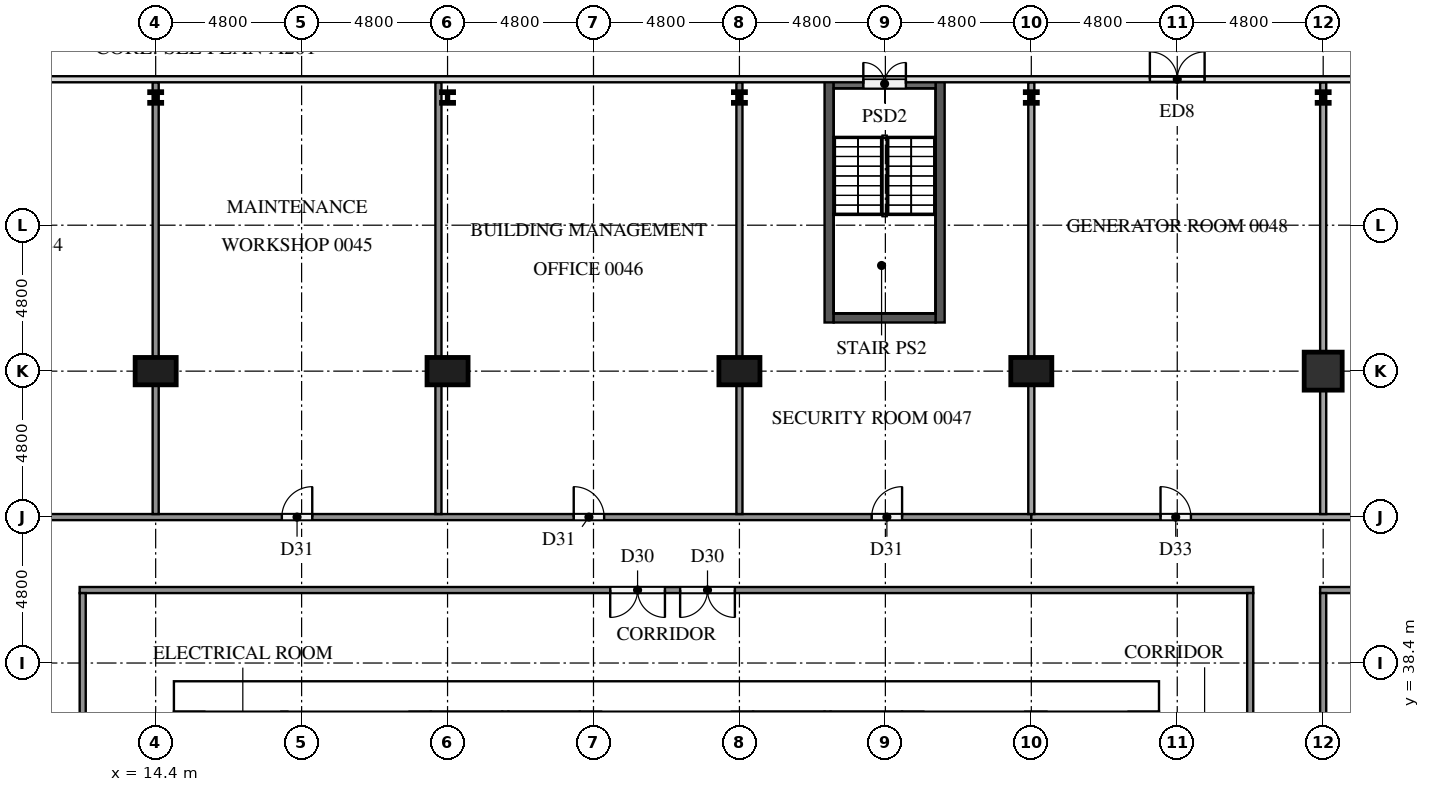
"""IFC4 building model, lengths in metres.
Left out: names, types, materials, properties, quantities, classifications, styles, units other than length and angle.
Written with IfcOpenShell. Run it as: python <this file> out.ifc"""

import sys

from ifc_helpers import new_model, si_unit, direction, frame, frame_2d, origin, origin_2d, place, context, subcontext, project, spatial, rectangle, i_section, extrude, element, fill, save


model = new_model("IFC4")
c1 = context("Model", 3, precision=1e-05, world=origin(), true_north=direction((0.0, 1.0)))
c2 = subcontext(c1, "Body", "Model", "MODEL_VIEW")
j1 = project(units=[si_unit("LENGTHUNIT", "METRE"), si_unit("PLANEANGLEUNIT", "RADIAN")], contexts=[c1])
p1 = place(None, origin())
s1 = spatial("IfcSite", under=j1, at=p1, CompositionType="ELEMENT")
p2 = place(p1, origin())
s2 = spatial("IfcBuilding", under=s1, at=p2, CompositionType="ELEMENT")
p3 = place(p2, origin())
s3 = spatial("IfcBuildingStorey", under=s2, at=p3, CompositionType="ELEMENT", Elevation=0.0)
for number, where, z_axis, x_axis in (
    (1, (36.55, 49.6, 0.0), (0.0, 0.0, 1.0), (0.0, 1.0, 0.0)),
    (2, (40.2, 49.6, 0.0), (0.0, 0.0, 1.0), (0.0, 1.0, 0.0)),
):
    element("IfcWall", number, at=place(p3, frame(where, z_axis=z_axis, x_axis=x_axis)), inside=s3, PredefinedType="SOLIDWALL", context=c2, shape_type="SweptSolid", body=[
        extrude(rectangle(XDim=8.0, YDim=0.3, at=frame_2d((4.0, 0.0))), origin(), (0.0, 0.0, 1.0), 5.7),
    ])
p4 = place(p3, frame((36.7, 49.75, 0.0), z_axis=(0.0, 0.0, 1.0), x_axis=(1.0, 0.0, 0.0)))
e3 = element("IfcWall", 3, at=p4, inside=s3, PredefinedType="SOLIDWALL", context=c2, shape_type="SweptSolid", body=[
    extrude(rectangle(XDim=3.35, YDim=0.3, at=frame_2d((1.675, 0.0))), origin(), (0.0, 0.0, 1.0), 5.7),
])
p5 = place(p3, frame((36.7, 57.45, 0.0), z_axis=(0.0, 0.0, 1.0), x_axis=(1.0, 0.0, 0.0)))
e4 = element("IfcWall", 4, at=p5, inside=s3, PredefinedType="SOLIDWALL", context=c2, shape_type="SweptSolid", body=[
    extrude(rectangle(XDim=3.35, YDim=0.3, at=frame_2d((1.675, 0.0))), origin(), (0.0, 0.0, 1.0), 5.7),
])
p6 = place(p5, frame((0.975, 0.0, 0.0)))
e5 = element("IfcOpeningElement", 5, at=p6, cuts=e4, PredefinedType="OPENING", context=c2, shape_type="SweptSolid", body=[
    extrude(rectangle(XDim=1.4, YDim=2.1, at=frame_2d((0.7, 1.05))), frame((0.0, 0.16, 0.0), z_axis=(0.0, -1.0, 0.0), x_axis=(1.0, 0.0, 0.0)), (0.0, 0.0, 1.0), 0.32),
])
p7 = place(p3, frame((15.0, 37.3, 0.0), z_axis=(0.0, 0.0, 1.0), x_axis=(1.0, 0.0, 0.0)))
e6 = element("IfcWall", 6, at=p7, inside=s3, PredefinedType="SHEAR", context=c2, shape_type="SweptSolid", body=[
    extrude(rectangle(XDim=32.4, YDim=1.0, at=frame_2d((16.2, 0.0))), origin(), (0.0, 0.0, 1.0), 5.7),
])
p8 = place(p7, frame((15.3, 0.0, 0.0)))
e7 = element("IfcOpeningElement", 7, at=p8, cuts=e6, PredefinedType="OPENING", context=c2, shape_type="SweptSolid", body=[
    extrude(rectangle(XDim=1.8, YDim=2.1, at=frame_2d((0.9, 1.05))), frame((0.0, 0.51, 0.0), z_axis=(0.0, -1.0, 0.0), x_axis=(1.0, 0.0, 0.0)), (0.0, 0.0, 1.0), 1.02),
])
p9 = place(p7, frame((1.766, 0.0, 0.0)))
e8 = element("IfcOpeningElement", 8, at=p9, cuts=e6, PredefinedType="OPENING", context=c2, shape_type="SweptSolid", body=[
    extrude(rectangle(XDim=1.0, YDim=2.1, at=frame_2d((0.5, 1.05))), frame((0.0, 0.51, 0.0), z_axis=(0.0, -1.0, 0.0), x_axis=(1.0, 0.0, 0.0)), (0.0, 0.0, 1.0), 1.02),
])
p10 = place(p7, frame((5.241, 0.0, 0.0)))
e9 = element("IfcOpeningElement", 9, at=p10, cuts=e6, PredefinedType="OPENING", context=c2, shape_type="SweptSolid", body=[
    extrude(rectangle(XDim=1.0, YDim=2.1, at=frame_2d((0.5, 1.05))), frame((0.0, 0.51, 0.0), z_axis=(0.0, -1.0, 0.0), x_axis=(1.0, 0.0, 0.0)), (0.0, 0.0, 1.0), 1.02),
])
for number, where, z_axis, x_axis in (
    (10, (28.7, 33.9, 0.0), (0.0, 0.0, 1.0), (0.0, 1.0, 0.0)),
    (11, (33.7, 33.9, 0.0), (0.0, 0.0, 1.0), (0.0, 1.0, 0.0)),
):
    element("IfcWall", number, at=place(p3, frame(where, z_axis=z_axis, x_axis=x_axis)), inside=s3, PredefinedType="SHEAR", context=c2, shape_type="SweptSolid", body=[
        extrude(rectangle(XDim=2.9, YDim=0.7, at=frame_2d((1.45, 0.0))), origin(), (0.0, 0.0, 1.0), 5.7),
    ])
p11 = place(p3, frame((52.8, 48.0, 0.0), z_axis=(0.0, 0.0, 1.0), x_axis=(1.0, 0.0, 0.0)))
e12 = element("IfcColumn", 12, at=p11, inside=s3, PredefinedType="COLUMN", context=c2, shape_type="SweptSolid", body=[
    extrude(rectangle(XDim=1.25, YDim=1.25, at=origin_2d()), origin(), (0.0, 0.0, 1.0), 5.7),
])
for number, where, z_axis, x_axis in (
    (13, (43.2, 48.0, 0.0), (0.0, 0.0, 1.0), (1.0, 0.0, 0.0)),
    (14, (33.6, 48.0, 0.0), (0.0, 0.0, 1.0), (1.0, 0.0, 0.0)),
    (15, (24.0, 48.0, 0.0), (0.0, 0.0, 1.0), (1.0, 0.0, 0.0)),
    (16, (14.4, 48.0, 0.0), (0.0, 0.0, 1.0), (1.0, 0.0, 0.0)),
):
    element("IfcColumn", number, at=place(p3, frame(where, z_axis=z_axis, x_axis=x_axis)), inside=s3, PredefinedType="COLUMN", context=c2, shape_type="SweptSolid", body=[
        extrude(rectangle(XDim=1.35, YDim=0.9, at=origin_2d()), origin(), (0.0, 0.0, 1.0), 5.7),
    ])
for number, where, z_axis, x_axis in (
    (17, (14.4, 57.0, 0.0), (0.0, 0.0, 1.0), (1.0, 0.0, 0.0)),
    (18, (24.0, 57.0, 0.0), (0.0, 0.0, 1.0), (1.0, 0.0, 0.0)),
    (19, (33.6, 57.0, 0.0), (0.0, 0.0, 1.0), (1.0, 0.0, 0.0)),
    (20, (43.2, 57.0, 0.0), (0.0, 0.0, 1.0), (1.0, 0.0, 0.0)),
    (21, (52.8, 57.0, 0.0), (0.0, 0.0, 1.0), (1.0, 0.0, 0.0)),
):
    element("IfcColumn", number, at=place(p3, frame(where, z_axis=z_axis, x_axis=x_axis)), inside=s3, PredefinedType="COLUMN", context=c2, shape_type="SweptSolid", body=[
        extrude(i_section(OverallWidth=0.396, OverallDepth=0.381, WebThickness=0.019, FlangeThickness=0.03, at=origin_2d()), origin(), (0.0, 0.0, 1.0), 5.7),
    ])
p12 = place(p3, frame((46.8, 57.6, 0.0), z_axis=(0.0, 0.0, 1.0), x_axis=(1.0, 0.0, 0.0)))
e22 = element("IfcWall", 22, at=p12, inside=s3, PredefinedType="SOLIDWALL", context=c2, shape_type="SweptSolid", body=[
    extrude(rectangle(XDim=2.4, YDim=0.15, at=frame_2d((1.2, 0.0))), origin(), (0.0, 0.0, 1.0), 5.7),
])
p13 = place(p12, frame((0.3, 0.0, 0.0)))
e23 = element("IfcOpeningElement", 23, at=p13, cuts=e22, PredefinedType="OPENING", context=c2, shape_type="SweptSolid", body=[
    extrude(rectangle(XDim=1.8, YDim=2.4, at=frame_2d((0.9, 1.2))), frame((0.0, 0.085, 0.0), z_axis=(0.0, -1.0, 0.0), x_axis=(1.0, 0.0, 0.0)), (0.0, 0.0, 1.0), 0.17),
])
for number, where, z_axis, x_axis in (
    (24, (25.9, 33.9, 0.0), (0.0, 0.0, 1.0), (0.0, 1.0, 0.0)),
    (25, (36.5, 33.9, 0.0), (0.0, 0.0, 1.0), (0.0, 1.0, 0.0)),
):
    element("IfcWall", number, at=place(p3, frame(where, z_axis=z_axis, x_axis=x_axis)), inside=s3, PredefinedType="SOLIDWALL", context=c2, shape_type="SweptSolid", body=[
        extrude(rectangle(XDim=2.9, YDim=0.2, at=frame_2d((1.45, 0.0))), origin(), (0.0, 0.0, 1.0), 5.7),
    ])
p14 = place(p3, frame((18.633, 31.6, 0.0), z_axis=(0.0, 0.0, 1.0), x_axis=(0.0, 1.0, 0.0)))
e26 = element("IfcWall", 26, at=p14, inside=s3, PredefinedType="PARTITIONING", context=c2, shape_type="SweptSolid", body=[
    extrude(rectangle(XDim=5.2, YDim=0.2, at=frame_2d((2.6, 0.0))), origin(), (0.0, 0.0, 1.0), 5.7),
])
p15 = place(p3, frame((50.5, 40.8, 0.0), z_axis=(0.0, 0.0, 1.0), x_axis=(-1.0, 0.0, 0.0)))
e27 = element("IfcWall", 27, at=p15, inside=s3, PredefinedType="PARTITIONING", context=c2, shape_type="SweptSolid", body=[
    extrude(rectangle(XDim=38.6, YDim=0.2, at=frame_2d((19.3, 0.0))), origin(), (0.0, 0.0, 1.0), 5.7),
])
p16 = place(p15, frame((19.35, 0.0, 0.0)))
e28 = element("IfcOpeningElement", 28, at=p16, cuts=e27, PredefinedType="OPENING", context=c2, shape_type="SweptSolid", body=[
    extrude(rectangle(XDim=1.8, YDim=2.1, at=frame_2d((0.9, 1.05))), frame((0.0, 0.11, 0.0), z_axis=(0.0, -1.0, 0.0), x_axis=(1.0, 0.0, 0.0)), (0.0, 0.0, 1.0), 0.22),
])
p17 = place(p15, frame((17.05, 0.0, 0.0)))
e29 = element("IfcOpeningElement", 29, at=p17, cuts=e27, PredefinedType="OPENING", context=c2, shape_type="SweptSolid", body=[
    extrude(rectangle(XDim=1.8, YDim=2.1, at=frame_2d((0.9, 1.05))), frame((0.0, 0.11, 0.0), z_axis=(0.0, -1.0, 0.0), x_axis=(1.0, 0.0, 0.0)), (0.0, 0.0, 1.0), 0.22),
])
p18 = place(p3, frame((67.3, 40.8, 0.0), z_axis=(0.0, 0.0, 1.0), x_axis=(-1.0, 0.0, 0.0)))
e30 = element("IfcWall", 30, at=p18, inside=s3, PredefinedType="PARTITIONING", context=c2, shape_type="SweptSolid", body=[
    extrude(rectangle(XDim=14.6, YDim=0.2, at=frame_2d((7.3, 0.0))), origin(), (0.0, 0.0, 1.0), 5.7),
])
p19 = place(p18, frame((6.85, 0.0, 0.0)))
e31 = element("IfcOpeningElement", 31, at=p19, cuts=e30, PredefinedType="OPENING", context=c2, shape_type="SweptSolid", body=[
    extrude(rectangle(XDim=1.0, YDim=2.1, at=frame_2d((0.5, 1.05))), frame((0.0, 0.11, 0.0), z_axis=(0.0, -1.0, 0.0), x_axis=(1.0, 0.0, 0.0)), (0.0, 0.0, 1.0), 0.22),
])
p20 = place(p3, frame((-4.9, 43.2, 0.0), z_axis=(0.0, 0.0, 1.0), x_axis=(1.0, 0.0, 0.0)))
e32 = element("IfcWall", 32, at=p20, inside=s3, PredefinedType="PARTITIONING", context=c2, shape_type="SweptSolid", body=[
    extrude(rectangle(XDim=48.1, YDim=0.2, at=frame_2d((24.05, 0.0))), origin(), (0.0, 0.0, 1.0), 5.7),
])
p21 = place(p20, frame((13.45, 0.0, 0.0)))
e33 = element("IfcOpeningElement", 33, at=p21, cuts=e32, PredefinedType="OPENING", context=c2, shape_type="SweptSolid", body=[
    extrude(rectangle(XDim=1.0, YDim=2.1, at=frame_2d((0.5, 1.05))), frame((0.0, 0.11, 0.0), z_axis=(0.0, -1.0, 0.0), x_axis=(1.0, 0.0, 0.0)), (0.0, 0.0, 1.0), 0.22),
])
p22 = place(p20, frame((23.45, 0.0, 0.0)))
e34 = element("IfcOpeningElement", 34, at=p22, cuts=e32, PredefinedType="OPENING", context=c2, shape_type="SweptSolid", body=[
    extrude(rectangle(XDim=1.0, YDim=2.1, at=frame_2d((0.5, 1.05))), frame((0.0, 0.11, 0.0), z_axis=(0.0, -1.0, 0.0), x_axis=(1.0, 0.0, 0.0)), (0.0, 0.0, 1.0), 0.22),
])
p23 = place(p20, frame((33.05, 0.0, 0.0)))
e35 = element("IfcOpeningElement", 35, at=p23, cuts=e32, PredefinedType="OPENING", context=c2, shape_type="SweptSolid", body=[
    extrude(rectangle(XDim=1.0, YDim=2.1, at=frame_2d((0.5, 1.05))), frame((0.0, 0.11, 0.0), z_axis=(0.0, -1.0, 0.0), x_axis=(1.0, 0.0, 0.0)), (0.0, 0.0, 1.0), 0.22),
])
p24 = place(p20, frame((42.85, 0.0, 0.0)))
e36 = element("IfcOpeningElement", 36, at=p24, cuts=e32, PredefinedType="OPENING", context=c2, shape_type="SweptSolid", body=[
    extrude(rectangle(XDim=1.0, YDim=2.1, at=frame_2d((0.5, 1.05))), frame((0.0, 0.11, 0.0), z_axis=(0.0, -1.0, 0.0), x_axis=(1.0, 0.0, 0.0)), (0.0, 0.0, 1.0), 0.22),
])
p25 = place(p3, frame((43.2, 43.2, 0.0), z_axis=(0.0, 0.0, 1.0), x_axis=(1.0, 0.0, 0.0)))
e37 = element("IfcWall", 37, at=p25, inside=s3, PredefinedType="PARTITIONING", context=c2, shape_type="SweptSolid", body=[
    extrude(rectangle(XDim=24.1, YDim=0.2, at=frame_2d((12.05, 0.0))), origin(), (0.0, 0.0, 1.0), 5.7),
])
p26 = place(p25, frame((4.25, 0.0, 0.0)))
e38 = element("IfcOpeningElement", 38, at=p26, cuts=e37, PredefinedType="OPENING", context=c2, shape_type="SweptSolid", body=[
    extrude(rectangle(XDim=1.0, YDim=2.1, at=frame_2d((0.5, 1.05))), frame((0.0, 0.11, 0.0), z_axis=(0.0, -1.0, 0.0), x_axis=(1.0, 0.0, 0.0)), (0.0, 0.0, 1.0), 0.22),
])
p27 = place(p25, frame((16.35, 0.0, 0.0)))
e39 = element("IfcOpeningElement", 39, at=p27, cuts=e37, PredefinedType="OPENING", context=c2, shape_type="SweptSolid", body=[
    extrude(rectangle(XDim=1.0, YDim=2.1, at=frame_2d((0.5, 1.05))), frame((0.0, 0.11, 0.0), z_axis=(0.0, -1.0, 0.0), x_axis=(1.0, 0.0, 0.0)), (0.0, 0.0, 1.0), 0.22),
])
p28 = place(p3, frame((12.0, 40.7, 0.0), z_axis=(0.0, 0.0, 1.0), x_axis=(0.0, -1.0, 0.0)))
e40 = element("IfcWall", 40, at=p28, inside=s3, PredefinedType="PARTITIONING", context=c2, shape_type="SweptSolid", body=[
    extrude(rectangle(XDim=15.8, YDim=0.2, at=frame_2d((7.9, 0.0))), origin(), (0.0, 0.0, 1.0), 5.7),
])
p29 = place(p28, frame((6.75, 0.0, 0.0)))
e41 = element("IfcOpeningElement", 41, at=p29, cuts=e40, PredefinedType="OPENING", context=c2, shape_type="SweptSolid", body=[
    extrude(rectangle(XDim=1.8, YDim=2.1, at=frame_2d((0.9, 1.05))), frame((0.0, 0.11, 0.0), z_axis=(0.0, -1.0, 0.0), x_axis=(1.0, 0.0, 0.0)), (0.0, 0.0, 1.0), 0.22),
])
for number, where, z_axis, x_axis in (
    (42, (14.4, 43.3, 0.0), (0.0, 0.0, 1.0), (0.0, 1.0, 0.0)),
    (43, (23.7, 43.3, 0.0), (0.0, 0.0, 1.0), (0.0, 1.0, 0.0)),
    (44, (33.6, 43.3, 0.0), (0.0, 0.0, 1.0), (0.0, 1.0, 0.0)),
    (45, (43.2, 43.3, 0.0), (0.0, 0.0, 1.0), (0.0, 1.0, 0.0)),
):
    element("IfcWall", number, at=place(p3, frame(where, z_axis=z_axis, x_axis=x_axis)), inside=s3, PredefinedType="PARTITIONING", context=c2, shape_type="SweptSolid", body=[
        extrude(rectangle(XDim=14.2, YDim=0.2, at=frame_2d((7.1, 0.0))), origin(), (0.0, 0.0, 1.0), 5.7),
    ])
p30 = place(p3, frame((50.4, 28.3, 0.0), z_axis=(0.0, 0.0, 1.0), x_axis=(0.0, 1.0, 0.0)))
e46 = element("IfcWall", 46, at=p30, inside=s3, PredefinedType="PARTITIONING", context=c2, shape_type="SweptSolid", body=[
    extrude(rectangle(XDim=12.4, YDim=0.2, at=frame_2d((6.2, 0.0))), origin(), (0.0, 0.0, 1.0), 5.7),
])
p31 = place(p30, frame((3.85, 0.0, 0.0)))
e47 = element("IfcOpeningElement", 47, at=p31, cuts=e46, PredefinedType="OPENING", context=c2, shape_type="SweptSolid", body=[
    extrude(rectangle(XDim=1.8, YDim=2.1, at=frame_2d((0.9, 1.05))), frame((0.0, 0.11, 0.0), z_axis=(0.0, -1.0, 0.0), x_axis=(1.0, 0.0, 0.0)), (0.0, 0.0, 1.0), 0.22),
])
p32 = place(p3, frame((52.8, 28.3, 0.0), z_axis=(0.0, 0.0, 1.0), x_axis=(0.0, 1.0, 0.0)))
e48 = element("IfcWall", 48, at=p32, inside=s3, PredefinedType="PARTITIONING", context=c2, shape_type="SweptSolid", body=[
    extrude(rectangle(XDim=12.4, YDim=0.2, at=frame_2d((6.2, 0.0))), origin(), (0.0, 0.0, 1.0), 5.7),
])
p33 = place(p3, frame((52.8, 43.3, 0.0), z_axis=(0.0, 0.0, 1.0), x_axis=(0.0, 1.0, 0.0)))
e49 = element("IfcWall", 49, at=p33, inside=s3, PredefinedType="PARTITIONING", context=c2, shape_type="SweptSolid", body=[
    extrude(rectangle(XDim=14.2, YDim=0.2, at=frame_2d((7.1, 0.0))), origin(), (0.0, 0.0, 1.0), 5.7),
])
p34 = place(p13, origin())
e50 = element("IfcDoor", 50, at=p34, inside=s3, OperationType="DOUBLE_DOOR_SINGLE_SWING", PredefinedType="DOOR", context=c2, shape_type="SweptSolid", body=[
    extrude(rectangle(XDim=1.8, YDim=2.4, at=frame_2d((0.9, 1.2))), frame((0.0, 0.025, 0.0), z_axis=(0.0, -1.0, 0.0), x_axis=(1.0, 0.0, 0.0)), (0.0, 0.0, 1.0), 0.05),
])
fill(e23, e50)
p35 = place(p8, origin())
e51 = element("IfcDoor", 51, at=p35, inside=s3, OperationType="DOUBLE_DOOR_SINGLE_SWING", PredefinedType="DOOR", context=c2, shape_type="SweptSolid", body=[
    extrude(rectangle(XDim=1.8, YDim=2.1, at=frame_2d((0.9, 1.05))), frame((0.0, 0.025, 0.0), z_axis=(0.0, -1.0, 0.0), x_axis=(1.0, 0.0, 0.0)), (0.0, 0.0, 1.0), 0.05),
])
fill(e7, e51)
p36 = place(p9, origin())
e52 = element("IfcDoor", 52, at=p36, inside=s3, OperationType="SINGLE_SWING_LEFT", PredefinedType="DOOR", context=c2, shape_type="SweptSolid", body=[
    extrude(rectangle(XDim=1.0, YDim=2.1, at=frame_2d((0.5, 1.05))), frame((0.0, 0.025, 0.0), z_axis=(0.0, -1.0, 0.0), x_axis=(1.0, 0.0, 0.0)), (0.0, 0.0, 1.0), 0.05),
])
fill(e8, e52)
p37 = place(p10, origin())
e53 = element("IfcDoor", 53, at=p37, inside=s3, OperationType="SINGLE_SWING_RIGHT", PredefinedType="DOOR", context=c2, shape_type="SweptSolid", body=[
    extrude(rectangle(XDim=1.0, YDim=2.1, at=frame_2d((0.5, 1.05))), frame((0.0, 0.025, 0.0), z_axis=(0.0, -1.0, 0.0), x_axis=(1.0, 0.0, 0.0)), (0.0, 0.0, 1.0), 0.05),
])
fill(e9, e53)
p38 = place(p6, origin())
e54 = element("IfcDoor", 54, at=p38, inside=s3, OperationType="DOUBLE_DOOR_SINGLE_SWING", PredefinedType="DOOR", context=c2, shape_type="SweptSolid", body=[
    extrude(rectangle(XDim=1.4, YDim=2.1, at=frame_2d((0.7, 1.05))), frame((0.0, 0.025, 0.0), z_axis=(0.0, -1.0, 0.0), x_axis=(1.0, 0.0, 0.0)), (0.0, 0.0, 1.0), 0.05),
])
fill(e5, e54)
p39 = place(p16, origin())
e55 = element("IfcDoor", 55, at=p39, inside=s3, OperationType="DOUBLE_DOOR_SINGLE_SWING", PredefinedType="DOOR", context=c2, shape_type="SweptSolid", body=[
    extrude(rectangle(XDim=1.8, YDim=2.1, at=frame_2d((0.9, 1.05))), frame((0.0, 0.025, 0.0), z_axis=(0.0, -1.0, 0.0), x_axis=(1.0, 0.0, 0.0)), (0.0, 0.0, 1.0), 0.05),
])
fill(e28, e55)
p40 = place(p22, origin())
e56 = element("IfcDoor", 56, at=p40, inside=s3, OperationType="SINGLE_SWING_RIGHT", PredefinedType="DOOR", context=c2, shape_type="SweptSolid", body=[
    extrude(rectangle(XDim=1.0, YDim=2.1, at=frame_2d((0.5, 1.05))), frame((0.0, 0.025, 0.0), z_axis=(0.0, -1.0, 0.0), x_axis=(1.0, 0.0, 0.0)), (0.0, 0.0, 1.0), 0.05),
])
fill(e34, e56)
p41 = place(p23, origin())
e57 = element("IfcDoor", 57, at=p41, inside=s3, OperationType="SINGLE_SWING_LEFT", PredefinedType="DOOR", context=c2, shape_type="SweptSolid", body=[
    extrude(rectangle(XDim=1.0, YDim=2.1, at=frame_2d((0.5, 1.05))), frame((0.0, 0.025, 0.0), z_axis=(0.0, -1.0, 0.0), x_axis=(1.0, 0.0, 0.0)), (0.0, 0.0, 1.0), 0.05),
])
fill(e35, e57)
p42 = place(p24, origin())
e58 = element("IfcDoor", 58, at=p42, inside=s3, OperationType="SINGLE_SWING_RIGHT", PredefinedType="DOOR", context=c2, shape_type="SweptSolid", body=[
    extrude(rectangle(XDim=1.0, YDim=2.1, at=frame_2d((0.5, 1.05))), frame((0.0, 0.025, 0.0), z_axis=(0.0, -1.0, 0.0), x_axis=(1.0, 0.0, 0.0)), (0.0, 0.0, 1.0), 0.05),
])
fill(e36, e58)
p43 = place(p26, origin())
e59 = element("IfcDoor", 59, at=p43, inside=s3, OperationType="SINGLE_SWING_LEFT", PredefinedType="DOOR", context=c2, shape_type="SweptSolid", body=[
    extrude(rectangle(XDim=1.0, YDim=2.1, at=frame_2d((0.5, 1.05))), frame((0.0, 0.025, 0.0), z_axis=(0.0, -1.0, 0.0), x_axis=(1.0, 0.0, 0.0)), (0.0, 0.0, 1.0), 0.05),
])
fill(e38, e59)
p44 = place(p17, origin())
e60 = element("IfcDoor", 60, at=p44, inside=s3, OperationType="DOUBLE_DOOR_SINGLE_SWING", PredefinedType="DOOR", context=c2, shape_type="SweptSolid", body=[
    extrude(rectangle(XDim=1.8, YDim=2.1, at=frame_2d((0.9, 1.05))), frame((0.0, 0.025, 0.0), z_axis=(0.0, -1.0, 0.0), x_axis=(1.0, 0.0, 0.0)), (0.0, 0.0, 1.0), 0.05),
])
fill(e29, e60)
save(model, sys.argv[1])
